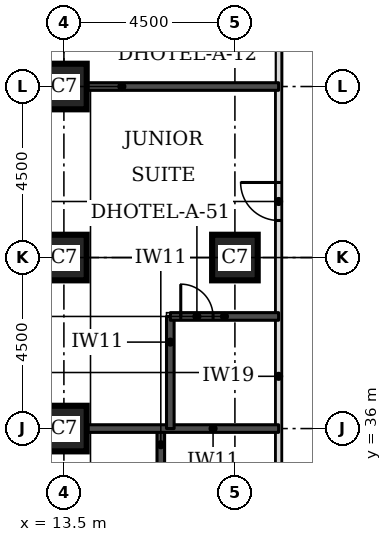
"""IFC4 building model, lengths in metres.
Left out: names, types, materials, properties, quantities, classifications, styles, units other than length and angle.
Written with IfcOpenShell. Run it as: python <this file> out.ifc"""

import sys

from ifc_helpers import new_model, si_unit, direction, frame, frame_2d, origin, origin_2d, place, context, subcontext, project, spatial, rectangle, extrude, element, fill, save


model = new_model("IFC4")
c1 = context("Model", 3, precision=1e-05, world=origin(), true_north=direction((0.0, 1.0)))
c2 = subcontext(c1, "Body", "Model", "MODEL_VIEW")
j1 = project(units=[si_unit("LENGTHUNIT", "METRE"), si_unit("PLANEANGLEUNIT", "RADIAN")], contexts=[c1])
p1 = place(None, origin())
s1 = spatial("IfcSite", under=j1, at=p1, CompositionType="ELEMENT")
p2 = place(p1, origin())
s2 = spatial("IfcBuilding", under=s1, at=p2, CompositionType="ELEMENT")
p3 = place(p2, frame((0.0, 0.0, 49.5)))
s3 = spatial("IfcBuildingStorey", under=s2, at=p3, CompositionType="ELEMENT", Elevation=49.5)
for number, where, z_axis, x_axis in (
    (1, (13.5, 36.0, 0.0), (0.0, 0.0, 1.0), (1.0, 0.0, 0.0)),
    (2, (13.5, 40.5, 0.0), (0.0, 0.0, 1.0), (1.0, 0.0, 0.0)),
    (3, (18.0, 40.5, 0.0), (0.0, 0.0, 1.0), (1.0, 0.0, 0.0)),
    (4, (13.5, 45.0, 0.0), (0.0, 0.0, 1.0), (1.0, 0.0, 0.0)),
):
    element("IfcColumn", number, at=place(p3, frame(where, z_axis=z_axis, x_axis=x_axis)), inside=s3, PredefinedType="COLUMN", context=c2, shape_type="SweptSolid", body=[
        extrude(rectangle(XDim=1.2, YDim=1.2, at=origin_2d()), origin(), (0.0, 0.0, 1.0), 3.3),
    ])
p4 = place(p3, frame((19.15, 23.65, 0.0), z_axis=(0.0, 0.0, 1.0), x_axis=(0.0, 1.0, 0.0)))
e5 = element("IfcWall", 5, at=p4, inside=s3, PredefinedType="PARTITIONING", context=c2, shape_type="SweptSolid", body=[
    extrude(rectangle(XDim=25.85, YDim=0.15, at=frame_2d((12.925, 0.0))), origin(), (0.0, 0.0, 1.0), 3.08),
])
p5 = place(p4, frame((1.775, 0.0, 0.0)))
e6 = element("IfcOpeningElement", 6, at=p5, cuts=e5, PredefinedType="OPENING", context=c2, shape_type="SweptSolid", body=[
    extrude(rectangle(XDim=1.0, YDim=2.1, at=frame_2d((0.5, 1.05))), frame((0.0, 0.085, 0.0), z_axis=(0.0, -1.0, 0.0), x_axis=(1.0, 0.0, 0.0)), (0.0, 0.0, 1.0), 0.17),
])
p6 = place(p4, frame((6.125, 0.0, 0.0)))
e7 = element("IfcOpeningElement", 7, at=p6, cuts=e5, PredefinedType="OPENING", context=c2, shape_type="SweptSolid", body=[
    extrude(rectangle(XDim=1.0, YDim=2.1, at=frame_2d((0.5, 1.05))), frame((0.0, 0.085, 0.0), z_axis=(0.0, -1.0, 0.0), x_axis=(1.0, 0.0, 0.0)), (0.0, 0.0, 1.0), 0.17),
])
p7 = place(p4, frame((17.825, 0.0, 0.0)))
e8 = element("IfcOpeningElement", 8, at=p7, cuts=e5, PredefinedType="OPENING", context=c2, shape_type="SweptSolid", body=[
    extrude(rectangle(XDim=1.0, YDim=2.1, at=frame_2d((0.5, 1.05))), frame((0.0, 0.085, 0.0), z_axis=(0.0, -1.0, 0.0), x_axis=(1.0, 0.0, 0.0)), (0.0, 0.0, 1.0), 0.17),
])
p8 = place(p4, frame((23.04, 0.0, 0.0)))
e9 = element("IfcOpeningElement", 9, at=p8, cuts=e5, PredefinedType="OPENING", context=c2, shape_type="SweptSolid", body=[
    extrude(rectangle(XDim=0.9, YDim=2.1, at=frame_2d((0.45, 1.05))), frame((0.0, 0.085, 0.0), z_axis=(0.0, -1.0, 0.0), x_axis=(1.0, 0.0, 0.0)), (0.0, 0.0, 1.0), 0.17),
])
p9 = place(p3, frame((16.05, 33.55, 0.0), z_axis=(0.0, 0.0, 1.0), x_axis=(0.0, 1.0, 0.0)))
e10 = element("IfcWall", 10, at=p9, inside=s3, PredefinedType="SOLIDWALL", context=c2, shape_type="SweptSolid", body=[
    extrude(rectangle(XDim=2.45, YDim=0.2, at=frame_2d((1.225, 0.0))), origin(), (0.0, 0.0, 1.0), 3.08),
])
p10 = place(p3, frame((14.1, 36.0, 0.0), z_axis=(0.0, 0.0, 1.0), x_axis=(1.0, 0.0, 0.0)))
e11 = element("IfcWall", 11, at=p10, inside=s3, PredefinedType="SOLIDWALL", context=c2, shape_type="SweptSolid", body=[
    extrude(rectangle(XDim=5.05, YDim=0.2, at=frame_2d((2.525, 0.0))), origin(), (0.0, 0.0, 1.0), 3.08),
])
p11 = place(p3, frame((16.3, 36.0, 0.0), z_axis=(0.0, 0.0, 1.0), x_axis=(0.0, 1.0, 0.0)))
e12 = element("IfcWall", 12, at=p11, inside=s3, PredefinedType="SOLIDWALL", context=c2, shape_type="SweptSolid", body=[
    extrude(rectangle(XDim=2.95, YDim=0.2, at=frame_2d((1.475, 0.0))), origin(), (0.0, 0.0, 1.0), 3.08),
])
p12 = place(p3, frame((16.3, 38.95, 0.0), z_axis=(0.0, 0.0, 1.0), x_axis=(1.0, 0.0, 0.0)))
e13 = element("IfcWall", 13, at=p12, inside=s3, PredefinedType="SOLIDWALL", context=c2, shape_type="SweptSolid", body=[
    extrude(rectangle(XDim=2.85, YDim=0.2, at=frame_2d((1.425, 0.0))), origin(), (0.0, 0.0, 1.0), 3.08),
])
p13 = place(p12, frame((0.275, 0.0, 0.0)))
e14 = element("IfcOpeningElement", 14, at=p13, cuts=e13, PredefinedType="OPENING", context=c2, shape_type="SweptSolid", body=[
    extrude(rectangle(XDim=0.85, YDim=2.1, at=frame_2d((0.425, 1.05))), frame((0.0, 0.11, 0.0), z_axis=(0.0, -1.0, 0.0), x_axis=(1.0, 0.0, 0.0)), (0.0, 0.0, 1.0), 0.22),
])
p14 = place(p3, frame((14.1, 45.0, 0.0), z_axis=(0.0, 0.0, 1.0), x_axis=(1.0, 0.0, 0.0)))
e15 = element("IfcWall", 15, at=p14, inside=s3, PredefinedType="SOLIDWALL", context=c2, shape_type="SweptSolid", body=[
    extrude(rectangle(XDim=5.05, YDim=0.2, at=frame_2d((2.525, 0.0))), origin(), (0.0, 0.0, 1.0), 3.08),
])
p15 = place(p7, origin())
e16 = element("IfcDoor", 16, at=p15, inside=s3, OperationType="SINGLE_SWING_RIGHT", PredefinedType="DOOR", context=c2, shape_type="SweptSolid", body=[
    extrude(rectangle(XDim=1.0, YDim=2.1, at=frame_2d((0.5, 1.05))), frame((0.0, 0.025, 0.0), z_axis=(0.0, -1.0, 0.0), x_axis=(1.0, 0.0, 0.0)), (0.0, 0.0, 1.0), 0.05),
])
fill(e8, e16)
p16 = place(p13, origin())
e17 = element("IfcDoor", 17, at=p16, inside=s3, OperationType="SINGLE_SWING_LEFT", PredefinedType="DOOR", context=c2, shape_type="SweptSolid", body=[
    extrude(rectangle(XDim=0.85, YDim=2.1, at=frame_2d((0.425, 1.05))), frame((0.0, 0.025, 0.0), z_axis=(0.0, -1.0, 0.0), x_axis=(1.0, 0.0, 0.0)), (0.0, 0.0, 1.0), 0.05),
])
fill(e14, e17)
save(model, sys.argv[1])
